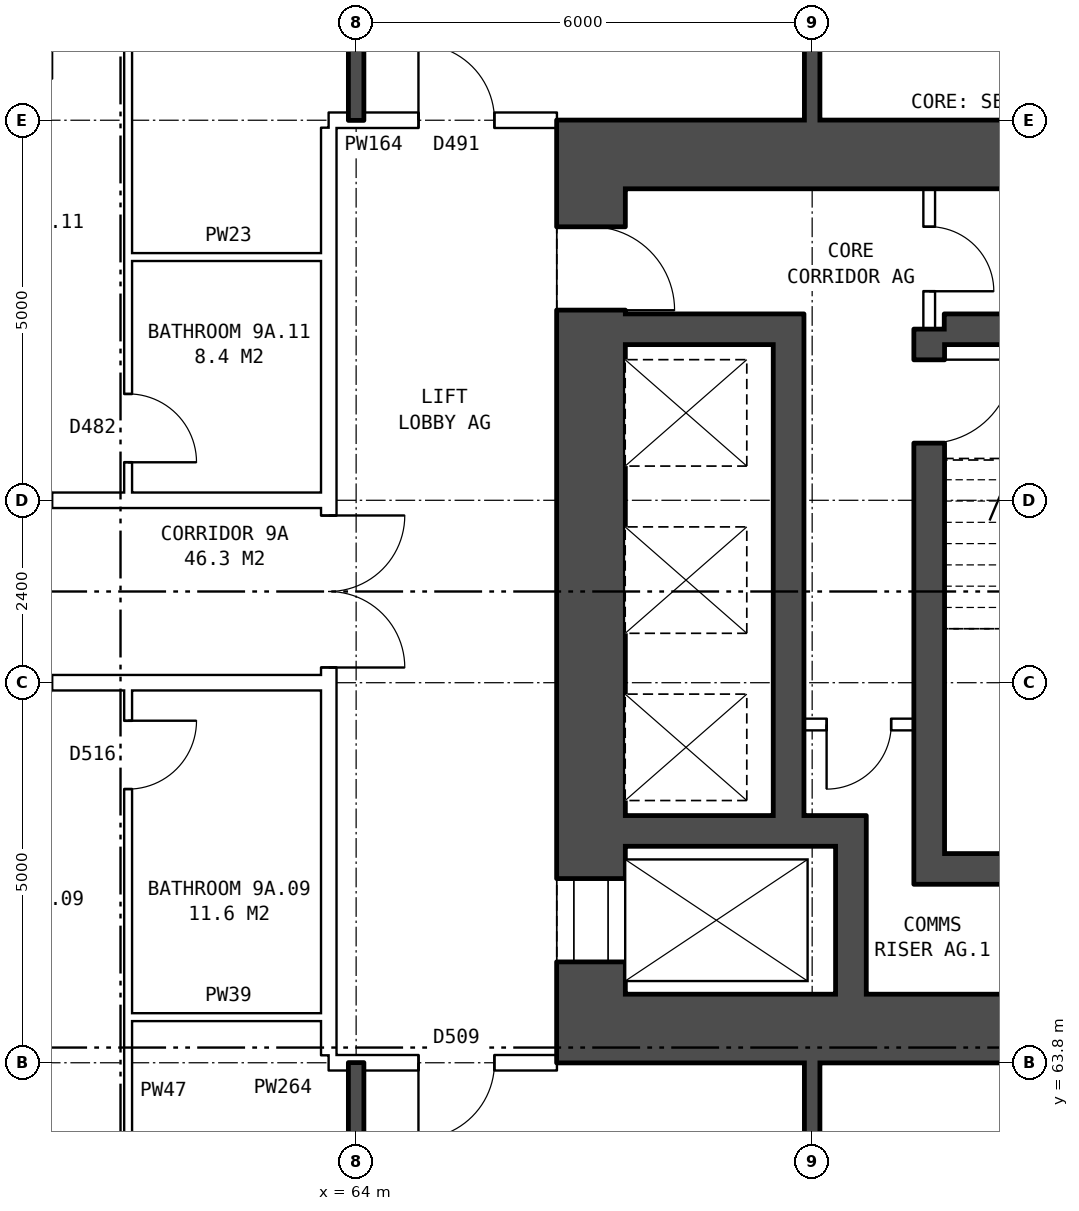
"""IFC4 building model, lengths in metres.
Left out: names, types, materials, properties, quantities, classifications, styles, units other than length and angle.
Written with IfcOpenShell. Run it as: python <this file> out.ifc"""

import sys

from ifc_helpers import new_model, si_unit, direction, frame, frame_2d, origin, place, context, subcontext, project, spatial, rectangle, extrude, element, fill, save


model = new_model("IFC4")
c1 = context("Model", 3, precision=1e-05, world=origin(), true_north=direction((0.0, 1.0)))
c2 = subcontext(c1, "Body", "Model", "MODEL_VIEW")
j1 = project(units=[si_unit("LENGTHUNIT", "METRE"), si_unit("PLANEANGLEUNIT", "RADIAN")], contexts=[c1])
p1 = place(None, origin())
s1 = spatial("IfcSite", under=j1, at=p1, CompositionType="ELEMENT")
p2 = place(p1, origin())
s2 = spatial("IfcBuilding", under=s1, at=p2, CompositionType="ELEMENT")
p3 = place(p2, frame((0.0, 0.0, 35.0)))
s3 = spatial("IfcBuildingStorey", under=s2, at=p3, CompositionType="ELEMENT", Elevation=35.0)
p4 = place(p3, frame((67.09, 64.7, 0.0), z_axis=(0.0, 0.0, 1.0), x_axis=(0.0, 1.0, 0.0)))
e1 = element("IfcWall", 1, at=p4, inside=s3, PredefinedType="SHEAR", context=c2, shape_type="SweptSolid", body=[
    extrude(rectangle(XDim=10.6, YDim=0.9, at=frame_2d((5.3, 0.0))), origin(), (0.0, 0.0, 1.0), 2.85),
])
p5 = place(p4, frame((0.425, 0.0, 0.0)))
e2 = element("IfcOpeningElement", 2, at=p5, cuts=e1, PredefinedType="OPENING", context=c2, shape_type="SweptSolid", body=[
    extrude(rectangle(XDim=1.1, YDim=2.1, at=frame_2d((0.55, 1.05))), frame((0.0, 0.46, 0.0), z_axis=(0.0, -1.0, 0.0), x_axis=(1.0, 0.0, 0.0)), (0.0, 0.0, 1.0), 0.92),
])
p6 = place(p4, frame((9.0, 0.0, 0.0)))
e3 = element("IfcOpeningElement", 3, at=p6, cuts=e1, PredefinedType="OPENING", context=c2, shape_type="SweptSolid", body=[
    extrude(rectangle(XDim=1.1, YDim=2.1, at=frame_2d((0.55, 1.05))), frame((0.0, 0.46, 0.0), z_axis=(0.0, -1.0, 0.0), x_axis=(1.0, 0.0, 0.0)), (0.0, 0.0, 1.0), 0.92),
])
for number, where, z_axis, x_axis in (
    (4, (66.64, 64.25, 0.0), (0.0, 0.0, 1.0), (1.0, 0.0, 0.0)),
    (5, (66.64, 75.75, 0.0), (0.0, 0.0, 1.0), (1.0, 0.0, 0.0)),
):
    element("IfcWall", number, at=place(p3, frame(where, z_axis=z_axis, x_axis=x_axis)), inside=s3, PredefinedType="SHEAR", context=c2, shape_type="SweptSolid", body=[
        extrude(rectangle(XDim=9.0, YDim=0.9, at=frame_2d((4.5, 0.0))), origin(), (0.0, 0.0, 1.0), 2.85),
    ])
p7 = place(p3, frame((71.74, 66.35, 0.0), z_axis=(0.0, 0.0, 1.0), x_axis=(1.0, 0.0, 0.0)))
e6 = element("IfcWall", 6, at=p7, inside=s3, PredefinedType="SHEAR", context=c2, shape_type="SweptSolid", body=[
    extrude(rectangle(XDim=3.0, YDim=0.4, at=frame_2d((1.5, 0.0))), origin(), (0.0, 0.0, 1.0), 2.85),
])
p8 = place(p3, frame((67.54, 66.85, 0.0), z_axis=(0.0, 0.0, 1.0), x_axis=(1.0, 0.0, 0.0)))
e7 = element("IfcWall", 7, at=p8, inside=s3, PredefinedType="SHEAR", context=c2, shape_type="SweptSolid", body=[
    extrude(rectangle(XDim=3.17, YDim=0.4, at=frame_2d((1.585, 0.0))), origin(), (0.0, 0.0, 1.0), 2.85),
])
p9 = place(p3, frame((69.89, 68.25, 0.0), z_axis=(0.0, 0.0, 1.0), x_axis=(1.0, 0.0, 0.0)))
e8 = element("IfcWall", 8, at=p9, inside=s3, PredefinedType="PARTITIONING", context=c2, shape_type="SweptSolid", body=[
    extrude(rectangle(XDim=1.45, YDim=0.15, at=frame_2d((0.725, 0.0))), origin(), (0.0, 0.0, 1.0), 2.85),
])
p10 = place(p9, frame((0.3, 0.0, 0.0)))
e9 = element("IfcOpeningElement", 9, at=p10, cuts=e8, PredefinedType="OPENING", context=c2, shape_type="SweptSolid", body=[
    extrude(rectangle(XDim=0.85, YDim=2.1, at=frame_2d((0.425, 1.05))), frame((0.0, 0.085, 0.0), z_axis=(0.0, -1.0, 0.0), x_axis=(1.0, 0.0, 0.0)), (0.0, 0.0, 1.0), 0.17),
])
p11 = place(p3, frame((67.54, 73.45, 0.0), z_axis=(0.0, 0.0, 1.0), x_axis=(1.0, 0.0, 0.0)))
e10 = element("IfcWall", 10, at=p11, inside=s3, PredefinedType="SHEAR", context=c2, shape_type="SweptSolid", body=[
    extrude(rectangle(XDim=1.95, YDim=0.4, at=frame_2d((0.975, 0.0))), origin(), (0.0, 0.0, 1.0), 2.85),
])
p12 = place(p3, frame((71.74, 73.45, 0.0), z_axis=(0.0, 0.0, 1.0), x_axis=(1.0, 0.0, 0.0)))
e11 = element("IfcWall", 11, at=p12, inside=s3, PredefinedType="SHEAR", context=c2, shape_type="SweptSolid", body=[
    extrude(rectangle(XDim=3.0, YDim=0.4, at=frame_2d((1.5, 0.0))), origin(), (0.0, 0.0, 1.0), 2.85),
])
p13 = place(p3, frame((69.69, 67.05, 0.0), z_axis=(0.0, 0.0, 1.0), x_axis=(0.0, 1.0, 0.0)))
e12 = element("IfcWall", 12, at=p13, inside=s3, PredefinedType="SHEAR", context=c2, shape_type="SweptSolid", body=[
    extrude(rectangle(XDim=6.6, YDim=0.4, at=frame_2d((3.3, 0.0))), origin(), (0.0, 0.0, 1.0), 2.85),
])
p14 = place(p3, frame((70.51, 64.7, 0.0), z_axis=(0.0, 0.0, 1.0), x_axis=(0.0, 1.0, 0.0)))
e13 = element("IfcWall", 13, at=p14, inside=s3, PredefinedType="SHEAR", context=c2, shape_type="SweptSolid", body=[
    extrude(rectangle(XDim=1.95, YDim=0.4, at=frame_2d((0.975, 0.0))), origin(), (0.0, 0.0, 1.0), 2.85),
])
p15 = place(p3, frame((71.54, 66.15, 0.0), z_axis=(0.0, 0.0, 1.0), x_axis=(0.0, 1.0, 0.0)))
e14 = element("IfcWall", 14, at=p15, inside=s3, PredefinedType="SHEAR", context=c2, shape_type="SweptSolid", body=[
    extrude(rectangle(XDim=7.3, YDim=0.4, at=frame_2d((3.65, 0.0))), origin(), (0.0, 0.0, 1.0), 2.85),
])
p16 = place(p15, frame((5.8, 0.0, 0.0)))
e15 = element("IfcOpeningElement", 15, at=p16, cuts=e14, PredefinedType="OPENING", context=c2, shape_type="SweptSolid", body=[
    extrude(rectangle(XDim=1.1, YDim=2.1, at=frame_2d((0.55, 1.05))), frame((0.0, 0.21, 0.0), z_axis=(0.0, -1.0, 0.0), x_axis=(1.0, 0.0, 0.0)), (0.0, 0.0, 1.0), 0.42),
])
p17 = place(p3, frame((71.54, 73.45, 0.0), z_axis=(0.0, 0.0, 1.0), x_axis=(0.0, 1.0, 0.0)))
e16 = element("IfcWall", 16, at=p17, inside=s3, PredefinedType="PARTITIONING", context=c2, shape_type="SweptSolid", body=[
    extrude(rectangle(XDim=1.85, YDim=0.15, at=frame_2d((0.925, 0.0))), origin(), (0.0, 0.0, 1.0), 2.85),
])
p18 = place(p17, frame((0.5, 0.0, 0.0)))
e17 = element("IfcOpeningElement", 17, at=p18, cuts=e16, PredefinedType="OPENING", context=c2, shape_type="SweptSolid", body=[
    extrude(rectangle(XDim=0.85, YDim=2.1, at=frame_2d((0.425, 1.05))), frame((0.0, 0.085, 0.0), z_axis=(0.0, -1.0, 0.0), x_axis=(1.0, 0.0, 0.0)), (0.0, 0.0, 1.0), 0.17),
])
p19 = place(p3, frame((63.64, 63.9, 0.0), z_axis=(0.0, 0.0, 1.0), x_axis=(0.0, 1.0, 0.0)))
e18 = element("IfcWall", 18, at=p19, inside=s3, PredefinedType="PARTITIONING", context=c2, shape_type="SweptSolid", body=[
    extrude(rectangle(XDim=12.2, YDim=0.2, at=frame_2d((6.1, 0.0))), origin(), (0.0, 0.0, 1.0), 2.85),
])
p20 = place(p19, frame((5.1, 0.0, 0.0)))
e19 = element("IfcOpeningElement", 19, at=p20, cuts=e18, PredefinedType="OPENING", context=c2, shape_type="SweptSolid", body=[
    extrude(rectangle(XDim=2.0, YDim=2.1, at=frame_2d((1.0, 1.05))), frame((0.0, 0.11, 0.0), z_axis=(0.0, -1.0, 0.0), x_axis=(1.0, 0.0, 0.0)), (0.0, 0.0, 1.0), 0.22),
])
p21 = place(p3, frame((63.64, 63.8, 0.0), z_axis=(0.0, 0.0, 1.0), x_axis=(1.0, 0.0, 0.0)))
e20 = element("IfcWall", 20, at=p21, inside=s3, PredefinedType="PARTITIONING", context=c2, shape_type="SweptSolid", body=[
    extrude(rectangle(XDim=3.0, YDim=0.2, at=frame_2d((1.5, 0.0))), origin(), (0.0, 0.0, 1.0), 2.85),
])
p22 = place(p21, frame((1.18, 0.0, 0.0)))
e21 = element("IfcOpeningElement", 21, at=p22, cuts=e20, PredefinedType="OPENING", context=c2, shape_type="SweptSolid", body=[
    extrude(rectangle(XDim=1.0, YDim=2.1, at=frame_2d((0.5, 1.05))), frame((0.0, 0.11, 0.0), z_axis=(0.0, -1.0, 0.0), x_axis=(1.0, 0.0, 0.0)), (0.0, 0.0, 1.0), 0.22),
])
p23 = place(p3, frame((61.0, 64.4, 0.0), z_axis=(0.0, 0.0, 1.0), x_axis=(1.0, 0.0, 0.0)))
e22 = element("IfcWall", 22, at=p23, inside=s3, PredefinedType="PARTITIONING", context=c2, shape_type="SweptSolid", body=[
    extrude(rectangle(XDim=2.64, YDim=0.1, at=frame_2d((1.32, 0.0))), origin(), (0.0, 0.0, 1.0), 2.85),
])
p24 = place(p3, frame((44.36, 68.8, 0.0), z_axis=(0.0, 0.0, 1.0), x_axis=(1.0, 0.0, 0.0)))
e23 = element("IfcWall", 23, at=p24, inside=s3, PredefinedType="PARTITIONING", context=c2, shape_type="SweptSolid", body=[
    extrude(rectangle(XDim=19.28, YDim=0.2, at=frame_2d((9.64, 0.0))), origin(), (0.0, 0.0, 1.0), 2.85),
])
p25 = place(p24, frame((14.64, 0.0, 0.0)))
e24 = element("IfcOpeningElement", 24, at=p25, cuts=e23, PredefinedType="OPENING", context=c2, shape_type="SweptSolid", body=[
    extrude(rectangle(XDim=1.0, YDim=2.1, at=frame_2d((0.5, 1.05))), frame((0.0, 0.11, 0.0), z_axis=(0.0, -1.0, 0.0), x_axis=(1.0, 0.0, 0.0)), (0.0, 0.0, 1.0), 0.22),
])
p26 = place(p24, frame((5.64, 0.0, 0.0)))
e25 = element("IfcOpeningElement", 25, at=p26, cuts=e23, PredefinedType="OPENING", context=c2, shape_type="SweptSolid", body=[
    extrude(rectangle(XDim=1.0, YDim=2.1, at=frame_2d((0.5, 1.05))), frame((0.0, 0.11, 0.0), z_axis=(0.0, -1.0, 0.0), x_axis=(1.0, 0.0, 0.0)), (0.0, 0.0, 1.0), 0.22),
])
p27 = place(p3, frame((44.36, 71.2, 0.0), z_axis=(0.0, 0.0, 1.0), x_axis=(1.0, 0.0, 0.0)))
e26 = element("IfcWall", 26, at=p27, inside=s3, PredefinedType="PARTITIONING", context=c2, shape_type="SweptSolid", body=[
    extrude(rectangle(XDim=19.28, YDim=0.2, at=frame_2d((9.64, 0.0))), origin(), (0.0, 0.0, 1.0), 2.85),
])
p28 = place(p27, frame((14.64, 0.0, 0.0)))
e27 = element("IfcOpeningElement", 27, at=p28, cuts=e26, PredefinedType="OPENING", context=c2, shape_type="SweptSolid", body=[
    extrude(rectangle(XDim=1.0, YDim=2.1, at=frame_2d((0.5, 1.05))), frame((0.0, 0.11, 0.0), z_axis=(0.0, -1.0, 0.0), x_axis=(1.0, 0.0, 0.0)), (0.0, 0.0, 1.0), 0.22),
])
p29 = place(p27, frame((5.64, 0.0, 0.0)))
e28 = element("IfcOpeningElement", 28, at=p29, cuts=e26, PredefinedType="OPENING", context=c2, shape_type="SweptSolid", body=[
    extrude(rectangle(XDim=1.0, YDim=2.1, at=frame_2d((0.5, 1.05))), frame((0.0, 0.11, 0.0), z_axis=(0.0, -1.0, 0.0), x_axis=(1.0, 0.0, 0.0)), (0.0, 0.0, 1.0), 0.22),
])
p30 = place(p3, frame((61.0, 74.4, 0.0), z_axis=(0.0, 0.0, 1.0), x_axis=(1.0, 0.0, 0.0)))
e29 = element("IfcWall", 29, at=p30, inside=s3, PredefinedType="PARTITIONING", context=c2, shape_type="SweptSolid", body=[
    extrude(rectangle(XDim=2.64, YDim=0.1, at=frame_2d((1.32, 0.0))), origin(), (0.0, 0.0, 1.0), 2.85),
])
p31 = place(p3, frame((63.64, 76.2, 0.0), z_axis=(0.0, 0.0, 1.0), x_axis=(1.0, 0.0, 0.0)))
e30 = element("IfcWall", 30, at=p31, inside=s3, PredefinedType="PARTITIONING", context=c2, shape_type="SweptSolid", body=[
    extrude(rectangle(XDim=3.0, YDim=0.2, at=frame_2d((1.5, 0.0))), origin(), (0.0, 0.0, 1.0), 2.85),
])
p32 = place(p31, frame((1.18, 0.0, 0.0)))
e31 = element("IfcOpeningElement", 31, at=p32, cuts=e30, PredefinedType="OPENING", context=c2, shape_type="SweptSolid", body=[
    extrude(rectangle(XDim=1.0, YDim=2.1, at=frame_2d((0.5, 1.05))), frame((0.0, 0.11, 0.0), z_axis=(0.0, -1.0, 0.0), x_axis=(1.0, 0.0, 0.0)), (0.0, 0.0, 1.0), 0.22),
])
p33 = place(p3, frame((61.0, 54.36, 0.0), z_axis=(0.0, 0.0, 1.0), x_axis=(0.0, 1.0, 0.0)))
e32 = element("IfcWall", 32, at=p33, inside=s3, PredefinedType="PARTITIONING", context=c2, shape_type="SweptSolid", body=[
    extrude(rectangle(XDim=14.34, YDim=0.1, at=frame_2d((7.17, 0.0))), origin(), (0.0, 0.0, 1.0), 2.85),
])
p34 = place(p33, frame((4.2, 0.0, 0.0)))
e33 = element("IfcOpeningElement", 33, at=p34, cuts=e32, PredefinedType="OPENING", context=c2, shape_type="SweptSolid", body=[
    extrude(rectangle(XDim=0.9, YDim=2.1, at=frame_2d((0.45, 1.05))), frame((0.0, 0.06, 0.0), z_axis=(0.0, -1.0, 0.0), x_axis=(1.0, 0.0, 0.0)), (0.0, 0.0, 1.0), 0.12),
])
p35 = place(p33, frame((13.04, 0.0, 0.0)))
e34 = element("IfcOpeningElement", 34, at=p35, cuts=e32, PredefinedType="OPENING", context=c2, shape_type="SweptSolid", body=[
    extrude(rectangle(XDim=0.9, YDim=2.1, at=frame_2d((0.45, 1.05))), frame((0.0, 0.06, 0.0), z_axis=(0.0, -1.0, 0.0), x_axis=(1.0, 0.0, 0.0)), (0.0, 0.0, 1.0), 0.12),
])
p36 = place(p3, frame((61.0, 71.3, 0.0), z_axis=(0.0, 0.0, 1.0), x_axis=(0.0, 1.0, 0.0)))
e35 = element("IfcWall", 35, at=p36, inside=s3, PredefinedType="PARTITIONING", context=c2, shape_type="SweptSolid", body=[
    extrude(rectangle(XDim=14.34, YDim=0.1, at=frame_2d((7.17, 0.0))), origin(), (0.0, 0.0, 1.0), 2.85),
])
p37 = place(p36, frame((6.74, 0.0, 0.0)))
e36 = element("IfcOpeningElement", 36, at=p37, cuts=e35, PredefinedType="OPENING", context=c2, shape_type="SweptSolid", body=[
    extrude(rectangle(XDim=0.9, YDim=2.1, at=frame_2d((0.45, 1.05))), frame((0.0, 0.06, 0.0), z_axis=(0.0, -1.0, 0.0), x_axis=(1.0, 0.0, 0.0)), (0.0, 0.0, 1.0), 0.12),
])
p38 = place(p36, frame((0.4, 0.0, 0.0)))
e37 = element("IfcOpeningElement", 37, at=p38, cuts=e35, PredefinedType="OPENING", context=c2, shape_type="SweptSolid", body=[
    extrude(rectangle(XDim=0.9, YDim=2.1, at=frame_2d((0.45, 1.05))), frame((0.0, 0.06, 0.0), z_axis=(0.0, -1.0, 0.0), x_axis=(1.0, 0.0, 0.0)), (0.0, 0.0, 1.0), 0.12),
])
for number, where, z_axis, x_axis in (
    (38, (64.0, 54.36, 0.0), (0.0, 0.0, 1.0), (0.0, 1.0, 0.0)),
    (39, (64.0, 76.2, 0.0), (0.0, 0.0, 1.0), (0.0, 1.0, 0.0)),
):
    element("IfcWall", number, at=place(p3, frame(where, z_axis=z_axis, x_axis=x_axis)), inside=s3, PredefinedType="SOLIDWALL", context=c2, shape_type="SweptSolid", body=[
        extrude(rectangle(XDim=9.44, YDim=0.2, at=frame_2d((4.72, 0.0))), origin(), (0.0, 0.0, 1.0), 2.85),
    ])
p39 = place(p3, frame((70.0, 54.36, 0.0), z_axis=(0.0, 0.0, 1.0), x_axis=(0.0, 1.0, 0.0)))
e40 = element("IfcWall", 40, at=p39, inside=s3, PredefinedType="SOLIDWALL", context=c2, shape_type="SweptSolid", body=[
    extrude(rectangle(XDim=9.44, YDim=0.2, at=frame_2d((4.72, 0.0))), origin(), (0.0, 0.0, 1.0), 2.85),
])
p40 = place(p39, frame((2.32, 0.0, 0.0)))
e41 = element("IfcOpeningElement", 41, at=p40, cuts=e40, PredefinedType="OPENING", context=c2, shape_type="SweptSolid", body=[
    extrude(rectangle(XDim=0.9, YDim=2.1, at=frame_2d((0.45, 1.05))), frame((0.0, 0.11, 0.0), z_axis=(0.0, -1.0, 0.0), x_axis=(1.0, 0.0, 0.0)), (0.0, 0.0, 1.0), 0.22),
])
p41 = place(p39, frame((7.59, 0.0, 0.0)))
e42 = element("IfcOpeningElement", 42, at=p41, cuts=e40, PredefinedType="OPENING", context=c2, shape_type="SweptSolid", body=[
    extrude(rectangle(XDim=0.9, YDim=2.1, at=frame_2d((0.45, 1.05))), frame((0.0, 0.11, 0.0), z_axis=(0.0, -1.0, 0.0), x_axis=(1.0, 0.0, 0.0)), (0.0, 0.0, 1.0), 0.22),
])
p42 = place(p3, frame((70.0, 76.2, 0.0), z_axis=(0.0, 0.0, 1.0), x_axis=(0.0, 1.0, 0.0)))
e43 = element("IfcWall", 43, at=p42, inside=s3, PredefinedType="SOLIDWALL", context=c2, shape_type="SweptSolid", body=[
    extrude(rectangle(XDim=9.44, YDim=0.2, at=frame_2d((4.72, 0.0))), origin(), (0.0, 0.0, 1.0), 2.85),
])
p43 = place(p42, frame((6.07, 0.0, 0.0)))
e44 = element("IfcOpeningElement", 44, at=p43, cuts=e43, PredefinedType="OPENING", context=c2, shape_type="SweptSolid", body=[
    extrude(rectangle(XDim=0.9, YDim=2.1, at=frame_2d((0.45, 1.05))), frame((0.0, 0.11, 0.0), z_axis=(0.0, -1.0, 0.0), x_axis=(1.0, 0.0, 0.0)), (0.0, 0.0, 1.0), 0.22),
])
p44 = place(p42, frame((0.95, 0.0, 0.0)))
e45 = element("IfcOpeningElement", 45, at=p44, cuts=e43, PredefinedType="OPENING", context=c2, shape_type="SweptSolid", body=[
    extrude(rectangle(XDim=0.9, YDim=2.1, at=frame_2d((0.45, 1.05))), frame((0.0, 0.11, 0.0), z_axis=(0.0, -1.0, 0.0), x_axis=(1.0, 0.0, 0.0)), (0.0, 0.0, 1.0), 0.22),
])
p45 = place(p5, origin())
e46 = element("IfcDoor", 46, at=p45, inside=s3, OperationType="DOUBLE_DOOR_SLIDING", PredefinedType="DOOR", context=c2, shape_type="SweptSolid", body=[
    extrude(rectangle(XDim=1.1, YDim=2.1, at=frame_2d((0.55, 1.05))), frame((0.0, -0.385, 0.0), z_axis=(0.0, -1.0, 0.0), x_axis=(1.0, 0.0, 0.0)), (0.0, 0.0, 1.0), 0.05),
])
fill(e2, e46)
p46 = place(p6, frame((1.1, 0.0, 0.0), z_axis=(0.0, 0.0, 1.0), x_axis=(-1.0, 0.0, 0.0)))
e47 = element("IfcDoor", 47, at=p46, inside=s3, OperationType="SINGLE_SWING_RIGHT", PredefinedType="DOOR", context=c2, shape_type="SweptSolid", body=[
    extrude(rectangle(XDim=1.1, YDim=2.1, at=frame_2d((0.55, 1.05))), frame((0.0, 0.435, 0.0), z_axis=(0.0, -1.0, 0.0), x_axis=(1.0, 0.0, 0.0)), (0.0, 0.0, 1.0), 0.05),
])
fill(e3, e47)
p47 = place(p16, frame((1.1, 0.0, 0.0), z_axis=(0.0, 0.0, 1.0), x_axis=(-1.0, 0.0, 0.0)))
e48 = element("IfcDoor", 48, at=p47, inside=s3, OperationType="SINGLE_SWING_LEFT", PredefinedType="DOOR", context=c2, shape_type="SweptSolid", body=[
    extrude(rectangle(XDim=1.1, YDim=2.1, at=frame_2d((0.55, 1.05))), frame((0.0, 0.025, 0.0), z_axis=(0.0, -1.0, 0.0), x_axis=(1.0, 0.0, 0.0)), (0.0, 0.0, 1.0), 0.05),
])
fill(e15, e48)
p48 = place(p10, frame((0.85, 0.0, 0.0), z_axis=(0.0, 0.0, 1.0), x_axis=(-1.0, 0.0, 0.0)))
e49 = element("IfcDoor", 49, at=p48, inside=s3, OperationType="SINGLE_SWING_RIGHT", PredefinedType="DOOR", context=c2, shape_type="SweptSolid", body=[
    extrude(rectangle(XDim=0.85, YDim=2.1, at=frame_2d((0.425, 1.05))), frame((0.0, 0.025, 0.0), z_axis=(0.0, -1.0, 0.0), x_axis=(1.0, 0.0, 0.0)), (0.0, 0.0, 1.0), 0.05),
])
fill(e9, e49)
p49 = place(p18, frame((0.85, 0.0, 0.0), z_axis=(0.0, 0.0, 1.0), x_axis=(-1.0, 0.0, 0.0)))
e50 = element("IfcDoor", 50, at=p49, inside=s3, OperationType="SINGLE_SWING_RIGHT", PredefinedType="DOOR", context=c2, shape_type="SweptSolid", body=[
    extrude(rectangle(XDim=0.85, YDim=2.1, at=frame_2d((0.425, 1.05))), frame((0.0, 0.025, 0.0), z_axis=(0.0, -1.0, 0.0), x_axis=(1.0, 0.0, 0.0)), (0.0, 0.0, 1.0), 0.05),
])
fill(e17, e50)
p50 = place(p20, frame((2.0, 0.0, 0.0), z_axis=(0.0, 0.0, 1.0), x_axis=(-1.0, 0.0, 0.0)))
e51 = element("IfcDoor", 51, at=p50, inside=s3, OperationType="DOUBLE_DOOR_SINGLE_SWING", PredefinedType="DOOR", context=c2, shape_type="SweptSolid", body=[
    extrude(rectangle(XDim=2.0, YDim=2.1, at=frame_2d((1.0, 1.05))), frame((0.0, 0.025, 0.0), z_axis=(0.0, -1.0, 0.0), x_axis=(1.0, 0.0, 0.0)), (0.0, 0.0, 1.0), 0.05),
])
fill(e19, e51)
p51 = place(p22, frame((1.0, 0.0, 0.0), z_axis=(0.0, 0.0, 1.0), x_axis=(-1.0, 0.0, 0.0)))
e52 = element("IfcDoor", 52, at=p51, inside=s3, OperationType="SINGLE_SWING_RIGHT", PredefinedType="DOOR", context=c2, shape_type="SweptSolid", body=[
    extrude(rectangle(XDim=1.0, YDim=2.1, at=frame_2d((0.5, 1.05))), frame((0.0, 0.025, 0.0), z_axis=(0.0, -1.0, 0.0), x_axis=(1.0, 0.0, 0.0)), (0.0, 0.0, 1.0), 0.05),
])
fill(e21, e52)
p52 = place(p32, origin())
e53 = element("IfcDoor", 53, at=p52, inside=s3, OperationType="SINGLE_SWING_LEFT", PredefinedType="DOOR", context=c2, shape_type="SweptSolid", body=[
    extrude(rectangle(XDim=1.0, YDim=2.1, at=frame_2d((0.5, 1.05))), frame((0.0, 0.025, 0.0), z_axis=(0.0, -1.0, 0.0), x_axis=(1.0, 0.0, 0.0)), (0.0, 0.0, 1.0), 0.05),
])
fill(e31, e53)
p53 = place(p35, frame((0.9, 0.0, 0.0), z_axis=(0.0, 0.0, 1.0), x_axis=(-1.0, 0.0, 0.0)))
e54 = element("IfcDoor", 54, at=p53, inside=s3, OperationType="SINGLE_SWING_LEFT", PredefinedType="DOOR", context=c2, shape_type="SweptSolid", body=[
    extrude(rectangle(XDim=0.9, YDim=2.1, at=frame_2d((0.45, 1.05))), frame((0.0, 0.025, 0.0), z_axis=(0.0, -1.0, 0.0), x_axis=(1.0, 0.0, 0.0)), (0.0, 0.0, 1.0), 0.05),
])
fill(e34, e54)
p54 = place(p38, frame((0.9, 0.0, 0.0), z_axis=(0.0, 0.0, 1.0), x_axis=(-1.0, 0.0, 0.0)))
e55 = element("IfcDoor", 55, at=p54, inside=s3, OperationType="SINGLE_SWING_RIGHT", PredefinedType="DOOR", context=c2, shape_type="SweptSolid", body=[
    extrude(rectangle(XDim=0.9, YDim=2.1, at=frame_2d((0.45, 1.05))), frame((0.0, 0.025, 0.0), z_axis=(0.0, -1.0, 0.0), x_axis=(1.0, 0.0, 0.0)), (0.0, 0.0, 1.0), 0.05),
])
fill(e37, e55)
save(model, sys.argv[1])
